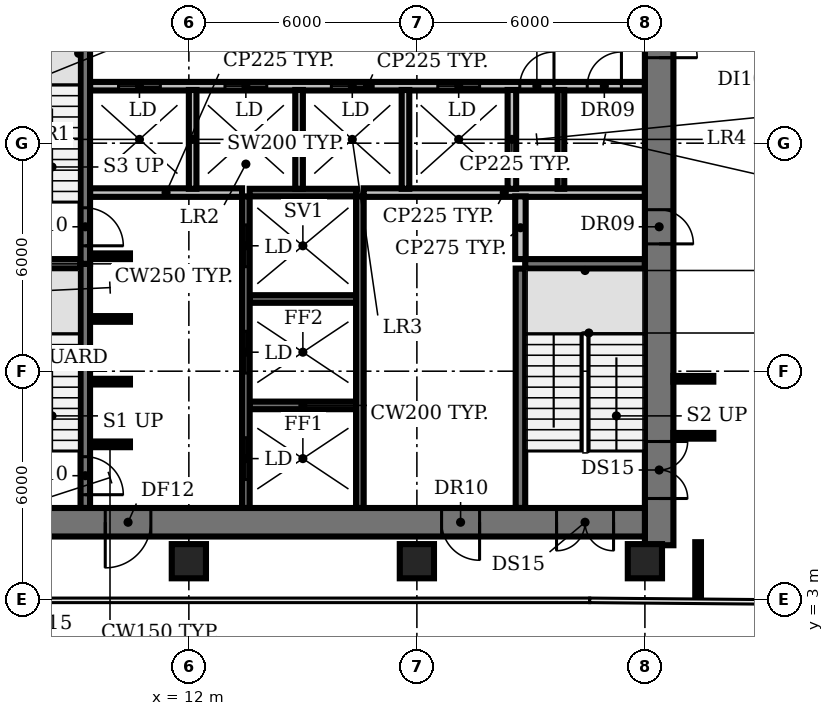
"""IFC4 building model, lengths in metres.
Left out: names, types, materials, properties, quantities, classifications, styles, units other than length and angle.
Written with IfcOpenShell. Run it as: python <this file> out.ifc"""

import sys

from ifc_helpers import new_model, si_unit, direction, frame, frame_2d, origin, origin_2d, place, context, subcontext, project, spatial, rectangle, extrude, element, fill, save


model = new_model("IFC4")
c1 = context("Model", 3, precision=1e-05, world=origin(), true_north=direction((0.0, 1.0)))
c2 = subcontext(c1, "Body", "Model", "MODEL_VIEW")
j1 = project(units=[si_unit("LENGTHUNIT", "METRE"), si_unit("PLANEANGLEUNIT", "RADIAN")], contexts=[c1])
p1 = place(None, origin())
s1 = spatial("IfcSite", under=j1, at=p1, CompositionType="ELEMENT")
p2 = place(p1, origin())
s2 = spatial("IfcBuilding", under=s1, at=p2, CompositionType="ELEMENT")
p3 = place(p2, frame((0.0, 0.0, 113.0)))
s3 = spatial("IfcBuildingStorey", under=s2, at=p3, CompositionType="ELEMENT", Elevation=113.0)
for number, where, z_axis, x_axis in (
    (1, (12.0, 4.0, 0.0), (0.0, 0.0, 1.0), (1.0, 0.0, 0.0)),
    (2, (18.0, 4.0, 0.0), (0.0, 0.0, 1.0), (1.0, 0.0, 0.0)),
    (3, (24.0, 4.0, 0.0), (0.0, 0.0, 1.0), (1.0, 0.0, 0.0)),
):
    element("IfcColumn", number, at=place(p3, frame(where, z_axis=z_axis, x_axis=x_axis)), inside=s3, PredefinedType="COLUMN", context=c2, shape_type="SweptSolid", body=[
        extrude(rectangle(XDim=0.9, YDim=0.9, at=origin_2d()), origin(), (0.0, 0.0, 1.0), 3.85),
    ])
p4 = place(p3, frame((9.4, 7.075, 0.0), z_axis=(0.0, 0.0, 1.0), x_axis=(1.0, 0.0, 0.0)))
e4 = element("IfcWall", 4, at=p4, inside=s3, PredefinedType="SHEAR", context=c2, shape_type="SweptSolid", body=[
    extrude(rectangle(XDim=1.05, YDim=0.15, at=frame_2d((0.525, 0.0))), origin(), (0.0, 0.0, 1.0), 3.85),
])
p5 = place(p3, frame((13.6, 8.1, 0.0), z_axis=(0.0, 0.0, 1.0), x_axis=(1.0, 0.0, 0.0)))
e5 = element("IfcWall", 5, at=p5, inside=s3, PredefinedType="SHEAR", context=c2, shape_type="SweptSolid", body=[
    extrude(rectangle(XDim=2.8, YDim=0.2, at=frame_2d((1.4, 0.0))), origin(), (0.0, 0.0, 1.0), 3.85),
])
for number, where, z_axis, x_axis in (
    (6, (9.4, 8.725, 0.0), (0.0, 0.0, 1.0), (1.0, 0.0, 0.0)),
    (7, (9.4, 10.375, 0.0), (0.0, 0.0, 1.0), (1.0, 0.0, 0.0)),
):
    element("IfcWall", number, at=place(p3, frame(where, z_axis=z_axis, x_axis=x_axis)), inside=s3, PredefinedType="SHEAR", context=c2, shape_type="SweptSolid", body=[
        extrude(rectangle(XDim=1.05, YDim=0.15, at=frame_2d((0.525, 0.0))), origin(), (0.0, 0.0, 1.0), 3.85),
    ])
p6 = place(p3, frame((13.6, 10.9, 0.0), z_axis=(0.0, 0.0, 1.0), x_axis=(1.0, 0.0, 0.0)))
e8 = element("IfcWall", 8, at=p6, inside=s3, PredefinedType="SHEAR", context=c2, shape_type="SweptSolid", body=[
    extrude(rectangle(XDim=2.8, YDim=0.2, at=frame_2d((1.4, 0.0))), origin(), (0.0, 0.0, 1.0), 3.85),
])
for number, where, z_axis, x_axis in (
    (9, (6.0, 11.825, 0.0), (0.0, 0.0, 1.0), (1.0, 0.0, 0.0)),
    (10, (20.85, 11.825, 0.0), (0.0, 0.0, 1.0), (1.0, 0.0, 0.0)),
):
    element("IfcWall", number, at=place(p3, frame(where, z_axis=z_axis, x_axis=x_axis)), inside=s3, PredefinedType="SHEAR", context=c2, shape_type="SweptSolid", body=[
        extrude(rectangle(XDim=3.15, YDim=0.25, at=frame_2d((1.575, 0.0))), origin(), (0.0, 0.0, 1.0), 3.85),
    ])
p7 = place(p3, frame((9.4, 12.025, 0.0), z_axis=(0.0, 0.0, 1.0), x_axis=(1.0, 0.0, 0.0)))
e11 = element("IfcWall", 11, at=p7, inside=s3, PredefinedType="SHEAR", context=c2, shape_type="SweptSolid", body=[
    extrude(rectangle(XDim=1.05, YDim=0.15, at=frame_2d((0.525, 0.0))), origin(), (0.0, 0.0, 1.0), 3.85),
])
p8 = place(p3, frame((9.4, 13.7, 0.0), z_axis=(0.0, 0.0, 1.0), x_axis=(1.0, 0.0, 0.0)))
e12 = element("IfcWall", 12, at=p8, inside=s3, PredefinedType="PARTITIONING", context=c2, shape_type="SweptSolid", body=[
    extrude(rectangle(XDim=4.0, YDim=0.225, at=frame_2d((2.0, 0.0))), origin(), (0.0, 0.0, 1.0), 3.85),
])
p9 = place(p3, frame((13.6, 13.7, 0.0), z_axis=(0.0, 0.0, 1.0), x_axis=(1.0, 0.0, 0.0)))
e13 = element("IfcWall", 13, at=p9, inside=s3, PredefinedType="SHEAR", context=c2, shape_type="SweptSolid", body=[
    extrude(rectangle(XDim=2.8, YDim=0.2, at=frame_2d((1.4, 0.0))), origin(), (0.0, 0.0, 1.0), 3.85),
])
p10 = place(p3, frame((16.6, 13.7, 0.0), z_axis=(0.0, 0.0, 1.0), x_axis=(1.0, 0.0, 0.0)))
e14 = element("IfcWall", 14, at=p10, inside=s3, PredefinedType="PARTITIONING", context=c2, shape_type="SweptSolid", body=[
    extrude(rectangle(XDim=7.4, YDim=0.225, at=frame_2d((3.7, 0.0))), origin(), (0.0, 0.0, 1.0), 3.85),
])
p11 = place(p3, frame((9.4, 16.5, 0.0), z_axis=(0.0, 0.0, 1.0), x_axis=(1.0, 0.0, 0.0)))
e15 = element("IfcWall", 15, at=p11, inside=s3, PredefinedType="PARTITIONING", context=c2, shape_type="SweptSolid", body=[
    extrude(rectangle(XDim=14.6, YDim=0.225, at=frame_2d((7.3, 0.0))), origin(), (0.0, 0.0, 1.0), 3.85),
])
p12 = place(p11, frame((0.75, 0.0, 0.0)))
e16 = element("IfcOpeningElement", 16, at=p12, cuts=e15, PredefinedType="OPENING", context=c2, shape_type="SweptSolid", body=[
    extrude(rectangle(XDim=1.1, YDim=2.1, at=frame_2d((0.55, 1.05))), frame((0.0, 0.123, 0.0), z_axis=(0.0, -1.0, 0.0), x_axis=(1.0, 0.0, 0.0)), (0.0, 0.0, 1.0), 0.245),
])
p13 = place(p11, frame((3.55, 0.0, 0.0)))
e17 = element("IfcOpeningElement", 17, at=p13, cuts=e15, PredefinedType="OPENING", context=c2, shape_type="SweptSolid", body=[
    extrude(rectangle(XDim=1.1, YDim=2.1, at=frame_2d((0.55, 1.05))), frame((0.0, 0.123, 0.0), z_axis=(0.0, -1.0, 0.0), x_axis=(1.0, 0.0, 0.0)), (0.0, 0.0, 1.0), 0.245),
])
p14 = place(p11, frame((6.35, 0.0, 0.0)))
e18 = element("IfcOpeningElement", 18, at=p14, cuts=e15, PredefinedType="OPENING", context=c2, shape_type="SweptSolid", body=[
    extrude(rectangle(XDim=1.1, YDim=2.1, at=frame_2d((0.55, 1.05))), frame((0.0, 0.123, 0.0), z_axis=(0.0, -1.0, 0.0), x_axis=(1.0, 0.0, 0.0)), (0.0, 0.0, 1.0), 0.245),
])
p15 = place(p11, frame((9.15, 0.0, 0.0)))
e19 = element("IfcOpeningElement", 19, at=p15, cuts=e15, PredefinedType="OPENING", context=c2, shape_type="SweptSolid", body=[
    extrude(rectangle(XDim=1.1, YDim=2.1, at=frame_2d((0.55, 1.05))), frame((0.0, 0.123, 0.0), z_axis=(0.0, -1.0, 0.0), x_axis=(1.0, 0.0, 0.0)), (0.0, 0.0, 1.0), 0.245),
])
p16 = place(p11, frame((11.308, 0.0, 0.0)))
e20 = element("IfcOpeningElement", 20, at=p16, cuts=e15, PredefinedType="OPENING", context=c2, shape_type="SweptSolid", body=[
    extrude(rectangle(XDim=0.9, YDim=2.1, at=frame_2d((0.45, 1.05))), frame((0.0, 0.123, 0.0), z_axis=(0.0, -1.0, 0.0), x_axis=(1.0, 0.0, 0.0)), (0.0, 0.0, 1.0), 0.245),
])
p17 = place(p11, frame((13.083, 0.0, 0.0)))
e21 = element("IfcOpeningElement", 21, at=p17, cuts=e15, PredefinedType="OPENING", context=c2, shape_type="SweptSolid", body=[
    extrude(rectangle(XDim=0.9, YDim=2.1, at=frame_2d((0.45, 1.05))), frame((0.0, 0.123, 0.0), z_axis=(0.0, -1.0, 0.0), x_axis=(1.0, 0.0, 0.0)), (0.0, 0.0, 1.0), 0.245),
])
p18 = place(p3, frame((9.275, 11.825, 0.0), z_axis=(0.0, 0.0, 1.0), x_axis=(0.0, -1.0, 0.0)))
e22 = element("IfcWall", 22, at=p18, inside=s3, PredefinedType="SHEAR", context=c2, shape_type="SweptSolid", body=[
    extrude(rectangle(XDim=6.425, YDim=0.25, at=frame_2d((3.212, 0.0))), origin(), (0.0, 0.0, 1.0), 3.85),
])
p19 = place(p18, frame((5.075, 0.0, 0.0)))
e23 = element("IfcOpeningElement", 23, at=p19, cuts=e22, PredefinedType="OPENING", context=c2, shape_type="SweptSolid", body=[
    extrude(rectangle(XDim=1.0, YDim=2.1, at=frame_2d((0.5, 1.05))), frame((0.0, 0.135, 0.0), z_axis=(0.0, -1.0, 0.0), x_axis=(1.0, 0.0, 0.0)), (0.0, 0.0, 1.0), 0.27),
])
p20 = place(p3, frame((9.275, 18.375, 0.0), z_axis=(0.0, 0.0, 1.0), x_axis=(0.0, -1.0, 0.0)))
e24 = element("IfcWall", 24, at=p20, inside=s3, PredefinedType="SHEAR", context=c2, shape_type="SweptSolid", body=[
    extrude(rectangle(XDim=6.55, YDim=0.25, at=frame_2d((3.275, 0.0))), origin(), (0.0, 0.0, 1.0), 3.85),
])
p21 = place(p20, frame((5.075, 0.0, 0.0)))
e25 = element("IfcOpeningElement", 25, at=p21, cuts=e24, PredefinedType="OPENING", context=c2, shape_type="SweptSolid", body=[
    extrude(rectangle(XDim=1.0, YDim=2.1, at=frame_2d((0.5, 1.05))), frame((0.0, 0.135, 0.0), z_axis=(0.0, -1.0, 0.0), x_axis=(1.0, 0.0, 0.0)), (0.0, 0.0, 1.0), 0.27),
])
p22 = place(p3, frame((12.1, 13.8, 0.0), z_axis=(0.0, 0.0, 1.0), x_axis=(0.0, 1.0, 0.0)))
e26 = element("IfcWall", 26, at=p22, inside=s3, PredefinedType="SOLIDWALL", context=c2, shape_type="SweptSolid", body=[
    extrude(rectangle(XDim=2.6, YDim=0.2, at=frame_2d((1.3, 0.0))), origin(), (0.0, 0.0, 1.0), 3.85),
])
p23 = place(p3, frame((13.5, 5.4, 0.0), z_axis=(0.0, 0.0, 1.0), x_axis=(0.0, 1.0, 0.0)))
e27 = element("IfcWall", 27, at=p23, inside=s3, PredefinedType="SHEAR", context=c2, shape_type="SweptSolid", body=[
    extrude(rectangle(XDim=8.2, YDim=0.2, at=frame_2d((4.1, 0.0))), origin(), (0.0, 0.0, 1.0), 3.85),
])
p24 = place(p23, frame((0.75, 0.0, 0.0)))
e28 = element("IfcOpeningElement", 28, at=p24, cuts=e27, PredefinedType="OPENING", context=c2, shape_type="SweptSolid", body=[
    extrude(rectangle(XDim=1.1, YDim=2.1, at=frame_2d((0.55, 1.05))), frame((0.0, 0.11, 0.0), z_axis=(0.0, -1.0, 0.0), x_axis=(1.0, 0.0, 0.0)), (0.0, 0.0, 1.0), 0.22),
])
p25 = place(p23, frame((3.55, 0.0, 0.0)))
e29 = element("IfcOpeningElement", 29, at=p25, cuts=e27, PredefinedType="OPENING", context=c2, shape_type="SweptSolid", body=[
    extrude(rectangle(XDim=1.1, YDim=2.1, at=frame_2d((0.55, 1.05))), frame((0.0, 0.11, 0.0), z_axis=(0.0, -1.0, 0.0), x_axis=(1.0, 0.0, 0.0)), (0.0, 0.0, 1.0), 0.22),
])
p26 = place(p23, frame((6.35, 0.0, 0.0)))
e30 = element("IfcOpeningElement", 30, at=p26, cuts=e27, PredefinedType="OPENING", context=c2, shape_type="SweptSolid", body=[
    extrude(rectangle(XDim=1.1, YDim=2.1, at=frame_2d((0.55, 1.05))), frame((0.0, 0.11, 0.0), z_axis=(0.0, -1.0, 0.0), x_axis=(1.0, 0.0, 0.0)), (0.0, 0.0, 1.0), 0.22),
])
p27 = place(p3, frame((14.9, 13.8, 0.0), z_axis=(0.0, 0.0, 1.0), x_axis=(0.0, 1.0, 0.0)))
e31 = element("IfcWall", 31, at=p27, inside=s3, PredefinedType="SOLIDWALL", context=c2, shape_type="SweptSolid", body=[
    extrude(rectangle(XDim=2.6, YDim=0.2, at=frame_2d((1.3, 0.0))), origin(), (0.0, 0.0, 1.0), 3.85),
])
p28 = place(p3, frame((16.5, 5.4, 0.0), z_axis=(0.0, 0.0, 1.0), x_axis=(0.0, 1.0, 0.0)))
e32 = element("IfcWall", 32, at=p28, inside=s3, PredefinedType="SHEAR", context=c2, shape_type="SweptSolid", body=[
    extrude(rectangle(XDim=8.2, YDim=0.2, at=frame_2d((4.1, 0.0))), origin(), (0.0, 0.0, 1.0), 3.85),
])
p29 = place(p3, frame((17.7, 13.8, 0.0), z_axis=(0.0, 0.0, 1.0), x_axis=(0.0, 1.0, 0.0)))
e33 = element("IfcWall", 33, at=p29, inside=s3, PredefinedType="SOLIDWALL", context=c2, shape_type="SweptSolid", body=[
    extrude(rectangle(XDim=2.6, YDim=0.2, at=frame_2d((1.3, 0.0))), origin(), (0.0, 0.0, 1.0), 3.85),
])
p30 = place(p3, frame((20.5, 13.8, 0.0), z_axis=(0.0, 0.0, 1.0), x_axis=(0.0, 1.0, 0.0)))
e34 = element("IfcWall", 34, at=p30, inside=s3, PredefinedType="PARTITIONING", context=c2, shape_type="SweptSolid", body=[
    extrude(rectangle(XDim=2.6, YDim=0.225, at=frame_2d((1.3, 0.0))), origin(), (0.0, 0.0, 1.0), 3.85),
])
p31 = place(p3, frame((20.725, 5.4, 0.0), z_axis=(0.0, 0.0, 1.0), x_axis=(0.0, 1.0, 0.0)))
e35 = element("IfcWall", 35, at=p31, inside=s3, PredefinedType="SHEAR", context=c2, shape_type="SweptSolid", body=[
    extrude(rectangle(XDim=6.3, YDim=0.25, at=frame_2d((3.15, 0.0))), origin(), (0.0, 0.0, 1.0), 3.85),
])
p32 = place(p3, frame((20.725, 11.95, 0.0), z_axis=(0.0, 0.0, 1.0), x_axis=(0.0, 1.0, 0.0)))
e36 = element("IfcWall", 36, at=p32, inside=s3, PredefinedType="PARTITIONING", context=c2, shape_type="SweptSolid", body=[
    extrude(rectangle(XDim=1.65, YDim=0.275, at=frame_2d((0.825, 0.0))), origin(), (0.0, 0.0, 1.0), 3.85),
])
p33 = place(p3, frame((21.79, 13.8, 0.0), z_axis=(0.0, 0.0, 1.0), x_axis=(0.0, 1.0, 0.0)))
e37 = element("IfcWall", 37, at=p33, inside=s3, PredefinedType="PARTITIONING", context=c2, shape_type="SweptSolid", body=[
    extrude(rectangle(XDim=2.6, YDim=0.175, at=frame_2d((1.3, 0.0))), origin(), (0.0, 0.0, 1.0), 3.85),
])
p34 = place(p3, frame((24.375, 25.55, 0.0), z_axis=(0.0, 0.0, 1.0), x_axis=(0.0, -1.0, 0.0)))
e38 = element("IfcWall", 38, at=p34, inside=s3, PredefinedType="SHEAR", context=c2, shape_type="SweptSolid", body=[
    extrude(rectangle(XDim=21.13, YDim=0.75, at=frame_2d((10.565, 0.0))), origin(), (0.0, 0.0, 1.0), 3.85),
])
p35 = place(p34, frame((18.4, 0.0, 0.0)))
e39 = element("IfcOpeningElement", 39, at=p35, cuts=e38, PredefinedType="OPENING", context=c2, shape_type="SweptSolid", body=[
    extrude(rectangle(XDim=1.5, YDim=2.1, at=frame_2d((0.75, 1.05))), frame((0.0, 0.385, 0.0), z_axis=(0.0, -1.0, 0.0), x_axis=(1.0, 0.0, 0.0)), (0.0, 0.0, 1.0), 0.77),
])
p36 = place(p34, frame((12.3, 0.0, 0.0)))
e40 = element("IfcOpeningElement", 40, at=p36, cuts=e38, PredefinedType="OPENING", context=c2, shape_type="SweptSolid", body=[
    extrude(rectangle(XDim=0.9, YDim=2.1, at=frame_2d((0.45, 1.05))), frame((0.0, 0.385, 0.0), z_axis=(0.0, -1.0, 0.0), x_axis=(1.0, 0.0, 0.0)), (0.0, 0.0, 1.0), 0.77),
])
p37 = place(p34, frame((6.3, 0.0, 0.0)))
e41 = element("IfcOpeningElement", 41, at=p37, cuts=e38, PredefinedType="OPENING", context=c2, shape_type="SweptSolid", body=[
    extrude(rectangle(XDim=2.0, YDim=2.1, at=frame_2d((1.0, 1.05))), frame((0.0, 0.385, 0.0), z_axis=(0.0, -1.0, 0.0), x_axis=(1.0, 0.0, 0.0)), (0.0, 0.0, 1.0), 0.77),
])
p38 = place(p3, frame((24.0, 5.025, 0.0), z_axis=(0.0, 0.0, 1.0), x_axis=(-1.0, 0.0, 0.0)))
e42 = element("IfcWall", 42, at=p38, inside=s3, PredefinedType="SHEAR", context=c2, shape_type="SweptSolid", body=[
    extrude(rectangle(XDim=18.0, YDim=0.75, at=frame_2d((9.0, 0.0))), origin(), (0.0, 0.0, 1.0), 3.85),
])
p39 = place(p38, frame((0.825, 0.0, 0.0)))
e43 = element("IfcOpeningElement", 43, at=p39, cuts=e42, PredefinedType="OPENING", context=c2, shape_type="SweptSolid", body=[
    extrude(rectangle(XDim=1.5, YDim=2.1, at=frame_2d((0.75, 1.05))), frame((0.0, 0.385, 0.0), z_axis=(0.0, -1.0, 0.0), x_axis=(1.0, 0.0, 0.0)), (0.0, 0.0, 1.0), 0.77),
])
p40 = place(p38, frame((15.675, 0.0, 0.0)))
e44 = element("IfcOpeningElement", 44, at=p40, cuts=e42, PredefinedType="OPENING", context=c2, shape_type="SweptSolid", body=[
    extrude(rectangle(XDim=1.5, YDim=2.1, at=frame_2d((0.75, 1.05))), frame((0.0, 0.385, 0.0), z_axis=(0.0, -1.0, 0.0), x_axis=(1.0, 0.0, 0.0)), (0.0, 0.0, 1.0), 0.77),
])
p41 = place(p38, frame((13.0, 0.0, 0.0)))
e45 = element("IfcOpeningElement", 45, at=p41, cuts=e42, PredefinedType="OPENING", context=c2, shape_type="SweptSolid", body=[
    extrude(rectangle(XDim=1.2, YDim=2.1, at=frame_2d((0.6, 1.05))), frame((0.0, 0.385, 0.0), z_axis=(0.0, -1.0, 0.0), x_axis=(1.0, 0.0, 0.0)), (0.0, 0.0, 1.0), 0.77),
])
p42 = place(p38, frame((4.35, 0.0, 0.0)))
e46 = element("IfcOpeningElement", 46, at=p42, cuts=e42, PredefinedType="OPENING", context=c2, shape_type="SweptSolid", body=[
    extrude(rectangle(XDim=1.0, YDim=2.1, at=frame_2d((0.5, 1.05))), frame((0.0, 0.385, 0.0), z_axis=(0.0, -1.0, 0.0), x_axis=(1.0, 0.0, 0.0)), (0.0, 0.0, 1.0), 0.77),
])
for number, where, z_axis, x_axis in (
    (47, (24.75, 7.3, 0.0), (0.0, 0.0, 1.0), (1.0, 0.0, 0.0)),
    (48, (24.75, 8.8, 0.0), (0.0, 0.0, 1.0), (1.0, 0.0, 0.0)),
):
    element("IfcWall", number, at=place(p3, frame(where, z_axis=z_axis, x_axis=x_axis)), inside=s3, PredefinedType="PARTITIONING", context=c2, shape_type="SweptSolid", body=[
        extrude(rectangle(XDim=1.05, YDim=0.15, at=frame_2d((0.525, 0.0))), origin(), (0.0, 0.0, 1.0), 2.83),
    ])
p43 = place(p3, frame((25.4, 3.0, 0.0), z_axis=(0.0, 0.0, 1.0), x_axis=(0.0, 1.0, 0.0)))
e49 = element("IfcWall", 49, at=p43, inside=s3, PredefinedType="PARTITIONING", context=c2, shape_type="SweptSolid", body=[
    extrude(rectangle(XDim=1.5, YDim=0.15, at=frame_2d((0.75, 0.0))), origin(), (0.0, 0.0, 1.0), 2.83),
])
p44 = place(p12, origin())
e50 = element("IfcDoor", 50, at=p44, inside=s3, OperationType="DOUBLE_DOOR_SLIDING", PredefinedType="DOOR", context=c2, shape_type="SweptSolid", body=[
    extrude(rectangle(XDim=1.1, YDim=2.1, at=frame_2d((0.55, 1.05))), frame((0.0, 0.025, 0.0), z_axis=(0.0, -1.0, 0.0), x_axis=(1.0, 0.0, 0.0)), (0.0, 0.0, 1.0), 0.05),
])
fill(e16, e50)
p45 = place(p13, origin())
e51 = element("IfcDoor", 51, at=p45, inside=s3, OperationType="DOUBLE_DOOR_SLIDING", PredefinedType="DOOR", context=c2, shape_type="SweptSolid", body=[
    extrude(rectangle(XDim=1.1, YDim=2.1, at=frame_2d((0.55, 1.05))), frame((0.0, 0.025, 0.0), z_axis=(0.0, -1.0, 0.0), x_axis=(1.0, 0.0, 0.0)), (0.0, 0.0, 1.0), 0.05),
])
fill(e17, e51)
p46 = place(p14, origin())
e52 = element("IfcDoor", 52, at=p46, inside=s3, OperationType="DOUBLE_DOOR_SLIDING", PredefinedType="DOOR", context=c2, shape_type="SweptSolid", body=[
    extrude(rectangle(XDim=1.1, YDim=2.1, at=frame_2d((0.55, 1.05))), frame((0.0, 0.025, 0.0), z_axis=(0.0, -1.0, 0.0), x_axis=(1.0, 0.0, 0.0)), (0.0, 0.0, 1.0), 0.05),
])
fill(e18, e52)
p47 = place(p15, origin())
e53 = element("IfcDoor", 53, at=p47, inside=s3, OperationType="DOUBLE_DOOR_SLIDING", PredefinedType="DOOR", context=c2, shape_type="SweptSolid", body=[
    extrude(rectangle(XDim=1.1, YDim=2.1, at=frame_2d((0.55, 1.05))), frame((0.0, 0.025, 0.0), z_axis=(0.0, -1.0, 0.0), x_axis=(1.0, 0.0, 0.0)), (0.0, 0.0, 1.0), 0.05),
])
fill(e19, e53)
p48 = place(p16, origin())
e54 = element("IfcDoor", 54, at=p48, inside=s3, OperationType="SINGLE_SWING_RIGHT", PredefinedType="DOOR", context=c2, shape_type="SweptSolid", body=[
    extrude(rectangle(XDim=0.9, YDim=2.1, at=frame_2d((0.45, 1.05))), frame((0.0, 0.025, 0.0), z_axis=(0.0, -1.0, 0.0), x_axis=(1.0, 0.0, 0.0)), (0.0, 0.0, 1.0), 0.05),
])
fill(e20, e54)
p49 = place(p17, origin())
e55 = element("IfcDoor", 55, at=p49, inside=s3, OperationType="SINGLE_SWING_RIGHT", PredefinedType="DOOR", context=c2, shape_type="SweptSolid", body=[
    extrude(rectangle(XDim=0.9, YDim=2.1, at=frame_2d((0.45, 1.05))), frame((0.0, 0.025, 0.0), z_axis=(0.0, -1.0, 0.0), x_axis=(1.0, 0.0, 0.0)), (0.0, 0.0, 1.0), 0.05),
])
fill(e21, e55)
p50 = place(p19, origin())
e56 = element("IfcDoor", 56, at=p50, inside=s3, OperationType="SINGLE_SWING_RIGHT", PredefinedType="DOOR", context=c2, shape_type="SweptSolid", body=[
    extrude(rectangle(XDim=1.0, YDim=2.1, at=frame_2d((0.5, 1.05))), frame((0.0, 0.025, 0.0), z_axis=(0.0, -1.0, 0.0), x_axis=(1.0, 0.0, 0.0)), (0.0, 0.0, 1.0), 0.05),
])
fill(e23, e56)
p51 = place(p21, origin())
e57 = element("IfcDoor", 57, at=p51, inside=s3, OperationType="SINGLE_SWING_RIGHT", PredefinedType="DOOR", context=c2, shape_type="SweptSolid", body=[
    extrude(rectangle(XDim=1.0, YDim=2.1, at=frame_2d((0.5, 1.05))), frame((0.0, 0.025, 0.0), z_axis=(0.0, -1.0, 0.0), x_axis=(1.0, 0.0, 0.0)), (0.0, 0.0, 1.0), 0.05),
])
fill(e25, e57)
p52 = place(p24, origin())
e58 = element("IfcDoor", 58, at=p52, inside=s3, OperationType="DOUBLE_DOOR_SLIDING", PredefinedType="DOOR", context=c2, shape_type="SweptSolid", body=[
    extrude(rectangle(XDim=1.1, YDim=2.1, at=frame_2d((0.55, 1.05))), frame((0.0, 0.025, 0.0), z_axis=(0.0, -1.0, 0.0), x_axis=(1.0, 0.0, 0.0)), (0.0, 0.0, 1.0), 0.05),
])
fill(e28, e58)
p53 = place(p25, origin())
e59 = element("IfcDoor", 59, at=p53, inside=s3, OperationType="DOUBLE_DOOR_SLIDING", PredefinedType="DOOR", context=c2, shape_type="SweptSolid", body=[
    extrude(rectangle(XDim=1.1, YDim=2.1, at=frame_2d((0.55, 1.05))), frame((0.0, 0.025, 0.0), z_axis=(0.0, -1.0, 0.0), x_axis=(1.0, 0.0, 0.0)), (0.0, 0.0, 1.0), 0.05),
])
fill(e29, e59)
p54 = place(p26, origin())
e60 = element("IfcDoor", 60, at=p54, inside=s3, OperationType="DOUBLE_DOOR_SLIDING", PredefinedType="DOOR", context=c2, shape_type="SweptSolid", body=[
    extrude(rectangle(XDim=1.1, YDim=2.1, at=frame_2d((0.55, 1.05))), frame((0.0, 0.025, 0.0), z_axis=(0.0, -1.0, 0.0), x_axis=(1.0, 0.0, 0.0)), (0.0, 0.0, 1.0), 0.05),
])
fill(e30, e60)
p55 = place(p35, origin())
e61 = element("IfcDoor", 61, at=p55, inside=s3, OperationType="DOUBLE_DOOR_SINGLE_SWING", PredefinedType="DOOR", context=c2, shape_type="SweptSolid", body=[
    extrude(rectangle(XDim=1.5, YDim=2.1, at=frame_2d((0.75, 1.05))), frame((0.0, 0.025, 0.0), z_axis=(0.0, -1.0, 0.0), x_axis=(1.0, 0.0, 0.0)), (0.0, 0.0, 1.0), 0.05),
])
fill(e39, e61)
p56 = place(p36, origin())
e62 = element("IfcDoor", 62, at=p56, inside=s3, OperationType="SINGLE_SWING_RIGHT", PredefinedType="DOOR", context=c2, shape_type="SweptSolid", body=[
    extrude(rectangle(XDim=0.9, YDim=2.1, at=frame_2d((0.45, 1.05))), frame((0.0, -0.315, 0.0), z_axis=(0.0, -1.0, 0.0), x_axis=(1.0, 0.0, 0.0)), (0.0, 0.0, 1.0), 0.05),
])
fill(e40, e62)
p57 = place(p37, origin())
e63 = element("IfcDoor", 63, at=p57, inside=s3, OperationType="DOUBLE_DOOR_SINGLE_SWING", PredefinedType="DOOR", context=c2, shape_type="SweptSolid", body=[
    extrude(rectangle(XDim=2.0, YDim=2.1, at=frame_2d((1.0, 1.05))), frame((0.0, 0.025, 0.0), z_axis=(0.0, -1.0, 0.0), x_axis=(1.0, 0.0, 0.0)), (0.0, 0.0, 1.0), 0.05),
])
fill(e41, e63)
p58 = place(p39, origin())
e64 = element("IfcDoor", 64, at=p58, inside=s3, OperationType="DOUBLE_DOOR_SINGLE_SWING", PredefinedType="DOOR", context=c2, shape_type="SweptSolid", body=[
    extrude(rectangle(XDim=1.5, YDim=2.1, at=frame_2d((0.75, 1.05))), frame((0.0, 0.025, 0.0), z_axis=(0.0, -1.0, 0.0), x_axis=(1.0, 0.0, 0.0)), (0.0, 0.0, 1.0), 0.05),
])
fill(e43, e64)
p59 = place(p41, origin())
e65 = element("IfcDoor", 65, at=p59, inside=s3, OperationType="SINGLE_SWING_RIGHT", PredefinedType="DOOR", context=c2, shape_type="SweptSolid", body=[
    extrude(rectangle(XDim=1.2, YDim=2.1, at=frame_2d((0.6, 1.05))), frame((0.0, 0.025, 0.0), z_axis=(0.0, -1.0, 0.0), x_axis=(1.0, 0.0, 0.0)), (0.0, 0.0, 1.0), 0.05),
])
fill(e45, e65)
p60 = place(p42, origin())
e66 = element("IfcDoor", 66, at=p60, inside=s3, OperationType="SINGLE_SWING_LEFT", PredefinedType="DOOR", context=c2, shape_type="SweptSolid", body=[
    extrude(rectangle(XDim=1.0, YDim=2.1, at=frame_2d((0.5, 1.05))), frame((0.0, -0.315, 0.0), z_axis=(0.0, -1.0, 0.0), x_axis=(1.0, 0.0, 0.0)), (0.0, 0.0, 1.0), 0.05),
])
fill(e46, e66)
save(model, sys.argv[1])
